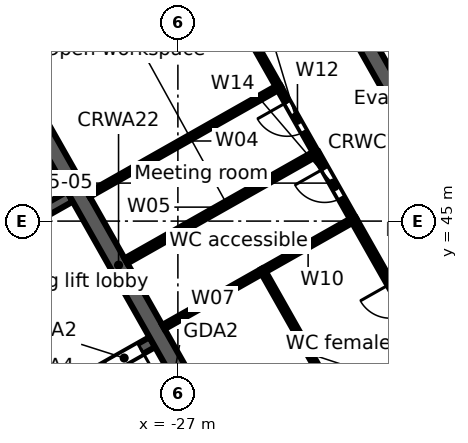
"""IFC4 building model, lengths in metres.
Left out: names, types, materials, properties, quantities, classifications, styles, units other than length and angle.
Written with IfcOpenShell. Run it as: python <this file> out.ifc"""

import sys

from ifc_helpers import new_model, si_unit, direction, frame, frame_2d, origin, place, context, subcontext, project, spatial, rectangle, extrude, element, fill, save


model = new_model("IFC4")
c1 = context("Model", 3, precision=1e-05, world=origin(), true_north=direction((0.0, 1.0)))
c2 = subcontext(c1, "Body", "Model", "MODEL_VIEW")
j1 = project(units=[si_unit("LENGTHUNIT", "METRE"), si_unit("PLANEANGLEUNIT", "RADIAN")], contexts=[c1])
p1 = place(None, origin())
s1 = spatial("IfcSite", under=j1, at=p1, CompositionType="ELEMENT")
p2 = place(p1, origin())
s2 = spatial("IfcBuilding", under=s1, at=p2, CompositionType="ELEMENT")
p3 = place(p2, frame((0.0, 0.0, 207.5)))
s3 = spatial("IfcBuildingStorey", under=s2, at=p3, CompositionType="ELEMENT", Elevation=207.5)
p4 = place(p3, frame((-0.046, 47.974, 0.0), z_axis=(0.0, 0.0, 1.0), x_axis=(-0.870356579543, -0.492421998337, 0.0)))
e1 = element("IfcWall", 1, at=p4, inside=s3, PredefinedType="STANDARD", context=c2, shape_type="SweptSolid", body=[
    extrude(rectangle(XDim=43.754, YDim=0.25, at=frame_2d((21.877, 0.0))), origin(), (0.0, 0.0, 1.0), 3.62),
])
p5 = place(p4, frame((41.061, 0.0, 0.8)))
e2 = element("IfcOpeningElement", 2, at=p5, cuts=e1, PredefinedType="OPENING", context=c2, shape_type="SweptSolid", body=[
    extrude(rectangle(XDim=2.4, YDim=2.2, at=frame_2d((1.2, 1.1))), frame((0.0, 0.135, 0.0), z_axis=(0.0, -1.0, 0.0), x_axis=(1.0, 0.0, 0.0)), (0.0, 0.0, 1.0), 0.27),
])
p6 = place(p4, frame((38.443, 0.0, 0.0)))
e3 = element("IfcOpeningElement", 3, at=p6, cuts=e1, PredefinedType="OPENING", context=c2, shape_type="SweptSolid", body=[
    extrude(rectangle(XDim=1.8, YDim=2.4, at=frame_2d((0.9, 1.2))), frame((0.0, 0.135, 0.0), z_axis=(0.0, -1.0, 0.0), x_axis=(1.0, 0.0, 0.0)), (0.0, 0.0, 1.0), 0.27),
])
p7 = place(p4, frame((35.225, 0.0, 0.8)))
e4 = element("IfcOpeningElement", 4, at=p7, cuts=e1, PredefinedType="OPENING", context=c2, shape_type="SweptSolid", body=[
    extrude(rectangle(XDim=2.4, YDim=2.2, at=frame_2d((1.2, 1.1))), frame((0.0, 0.135, 0.0), z_axis=(0.0, -1.0, 0.0), x_axis=(1.0, 0.0, 0.0)), (0.0, 0.0, 1.0), 0.27),
])
p8 = place(p4, frame((32.307, 0.0, 0.8)))
e5 = element("IfcOpeningElement", 5, at=p8, cuts=e1, PredefinedType="OPENING", context=c2, shape_type="SweptSolid", body=[
    extrude(rectangle(XDim=2.4, YDim=2.2, at=frame_2d((1.2, 1.1))), frame((0.0, 0.135, 0.0), z_axis=(0.0, -1.0, 0.0), x_axis=(1.0, 0.0, 0.0)), (0.0, 0.0, 1.0), 0.27),
])
p9 = place(p4, frame((29.688, 0.0, 0.0)))
e6 = element("IfcOpeningElement", 6, at=p9, cuts=e1, PredefinedType="OPENING", context=c2, shape_type="SweptSolid", body=[
    extrude(rectangle(XDim=1.8, YDim=2.4, at=frame_2d((0.9, 1.2))), frame((0.0, 0.135, 0.0), z_axis=(0.0, -1.0, 0.0), x_axis=(1.0, 0.0, 0.0)), (0.0, 0.0, 1.0), 0.27),
])
p10 = place(p4, frame((26.47, 0.0, 0.8)))
e7 = element("IfcOpeningElement", 7, at=p10, cuts=e1, PredefinedType="OPENING", context=c2, shape_type="SweptSolid", body=[
    extrude(rectangle(XDim=2.4, YDim=2.2, at=frame_2d((1.2, 1.1))), frame((0.0, 0.135, 0.0), z_axis=(0.0, -1.0, 0.0), x_axis=(1.0, 0.0, 0.0)), (0.0, 0.0, 1.0), 0.27),
])
p11 = place(p4, frame((23.552, 0.0, 0.8)))
e8 = element("IfcOpeningElement", 8, at=p11, cuts=e1, PredefinedType="OPENING", context=c2, shape_type="SweptSolid", body=[
    extrude(rectangle(XDim=2.4, YDim=2.2, at=frame_2d((1.2, 1.1))), frame((0.0, 0.135, 0.0), z_axis=(0.0, -1.0, 0.0), x_axis=(1.0, 0.0, 0.0)), (0.0, 0.0, 1.0), 0.27),
])
p12 = place(p4, frame((20.934, 0.0, 0.0)))
e9 = element("IfcOpeningElement", 9, at=p12, cuts=e1, PredefinedType="OPENING", context=c2, shape_type="SweptSolid", body=[
    extrude(rectangle(XDim=1.8, YDim=2.4, at=frame_2d((0.9, 1.2))), frame((0.0, 0.135, 0.0), z_axis=(0.0, -1.0, 0.0), x_axis=(1.0, 0.0, 0.0)), (0.0, 0.0, 1.0), 0.27),
])
p13 = place(p4, frame((17.716, 0.0, 0.8)))
e10 = element("IfcOpeningElement", 10, at=p13, cuts=e1, PredefinedType="OPENING", context=c2, shape_type="SweptSolid", body=[
    extrude(rectangle(XDim=2.4, YDim=2.2, at=frame_2d((1.2, 1.1))), frame((0.0, 0.135, 0.0), z_axis=(0.0, -1.0, 0.0), x_axis=(1.0, 0.0, 0.0)), (0.0, 0.0, 1.0), 0.27),
])
p14 = place(p4, frame((14.798, 0.0, 0.8)))
e11 = element("IfcOpeningElement", 11, at=p14, cuts=e1, PredefinedType="OPENING", context=c2, shape_type="SweptSolid", body=[
    extrude(rectangle(XDim=2.4, YDim=2.2, at=frame_2d((1.2, 1.1))), frame((0.0, 0.135, 0.0), z_axis=(0.0, -1.0, 0.0), x_axis=(1.0, 0.0, 0.0)), (0.0, 0.0, 1.0), 0.27),
])
p15 = place(p4, frame((12.179, 0.0, 0.0)))
e12 = element("IfcOpeningElement", 12, at=p15, cuts=e1, PredefinedType="OPENING", context=c2, shape_type="SweptSolid", body=[
    extrude(rectangle(XDim=1.8, YDim=2.4, at=frame_2d((0.9, 1.2))), frame((0.0, 0.135, 0.0), z_axis=(0.0, -1.0, 0.0), x_axis=(1.0, 0.0, 0.0)), (0.0, 0.0, 1.0), 0.27),
])
p16 = place(p4, frame((8.961, 0.0, 0.8)))
e13 = element("IfcOpeningElement", 13, at=p16, cuts=e1, PredefinedType="OPENING", context=c2, shape_type="SweptSolid", body=[
    extrude(rectangle(XDim=2.4, YDim=2.2, at=frame_2d((1.2, 1.1))), frame((0.0, 0.135, 0.0), z_axis=(0.0, -1.0, 0.0), x_axis=(1.0, 0.0, 0.0)), (0.0, 0.0, 1.0), 0.27),
])
p17 = place(p4, frame((6.043, 0.0, 0.8)))
e14 = element("IfcOpeningElement", 14, at=p17, cuts=e1, PredefinedType="OPENING", context=c2, shape_type="SweptSolid", body=[
    extrude(rectangle(XDim=2.4, YDim=2.2, at=frame_2d((1.2, 1.1))), frame((0.0, 0.135, 0.0), z_axis=(0.0, -1.0, 0.0), x_axis=(1.0, 0.0, 0.0)), (0.0, 0.0, 1.0), 0.27),
])
p18 = place(p4, frame((3.425, 0.0, 0.0)))
e15 = element("IfcOpeningElement", 15, at=p18, cuts=e1, PredefinedType="OPENING", context=c2, shape_type="SweptSolid", body=[
    extrude(rectangle(XDim=1.8, YDim=2.4, at=frame_2d((0.9, 1.2))), frame((0.0, 0.135, 0.0), z_axis=(0.0, -1.0, 0.0), x_axis=(1.0, 0.0, 0.0)), (0.0, 0.0, 1.0), 0.27),
])
p19 = place(p4, frame((0.207, 0.0, 0.8)))
e16 = element("IfcOpeningElement", 16, at=p19, cuts=e1, PredefinedType="OPENING", context=c2, shape_type="SweptSolid", body=[
    extrude(rectangle(XDim=2.4, YDim=2.2, at=frame_2d((1.2, 1.1))), frame((0.0, 0.135, 0.0), z_axis=(0.0, -1.0, 0.0), x_axis=(1.0, 0.0, 0.0)), (0.0, 0.0, 1.0), 0.27),
])
p20 = place(p3, frame((-58.732, 38.771, 0.0), z_axis=(0.0, 0.0, 1.0), x_axis=(0.870354824205, 0.492425100887, 0.0)))
e17 = element("IfcWall", 17, at=p20, inside=s3, PredefinedType="STANDARD", context=c2, shape_type="SweptSolid", body=[
    extrude(rectangle(XDim=64.006, YDim=0.25, at=frame_2d((32.003, 0.0))), origin(), (0.0, 0.0, 1.0), 3.62),
])
p21 = place(p20, frame((61.259, 0.0, 0.8)))
e18 = element("IfcOpeningElement", 18, at=p21, cuts=e17, PredefinedType="OPENING", context=c2, shape_type="SweptSolid", body=[
    extrude(rectangle(XDim=2.4, YDim=2.2, at=frame_2d((1.2, 1.1))), frame((0.0, 0.135, 0.0), z_axis=(0.0, -1.0, 0.0), x_axis=(1.0, 0.0, 0.0)), (0.0, 0.0, 1.0), 0.27),
])
p22 = place(p20, frame((58.216, 0.0, 0.8)))
e19 = element("IfcOpeningElement", 19, at=p22, cuts=e17, PredefinedType="OPENING", context=c2, shape_type="SweptSolid", body=[
    extrude(rectangle(XDim=2.4, YDim=2.2, at=frame_2d((1.2, 1.1))), frame((0.0, 0.135, 0.0), z_axis=(0.0, -1.0, 0.0), x_axis=(1.0, 0.0, 0.0)), (0.0, 0.0, 1.0), 0.27),
])
p23 = place(p20, frame((55.173, 0.0, 0.8)))
e20 = element("IfcOpeningElement", 20, at=p23, cuts=e17, PredefinedType="OPENING", context=c2, shape_type="SweptSolid", body=[
    extrude(rectangle(XDim=2.4, YDim=2.2, at=frame_2d((1.2, 1.1))), frame((0.0, 0.135, 0.0), z_axis=(0.0, -1.0, 0.0), x_axis=(1.0, 0.0, 0.0)), (0.0, 0.0, 1.0), 0.27),
])
p24 = place(p20, frame((52.129, 0.0, 0.8)))
e21 = element("IfcOpeningElement", 21, at=p24, cuts=e17, PredefinedType="OPENING", context=c2, shape_type="SweptSolid", body=[
    extrude(rectangle(XDim=2.4, YDim=2.2, at=frame_2d((1.2, 1.1))), frame((0.0, 0.135, 0.0), z_axis=(0.0, -1.0, 0.0), x_axis=(1.0, 0.0, 0.0)), (0.0, 0.0, 1.0), 0.27),
])
p25 = place(p20, frame((49.086, 0.0, 0.8)))
e22 = element("IfcOpeningElement", 22, at=p25, cuts=e17, PredefinedType="OPENING", context=c2, shape_type="SweptSolid", body=[
    extrude(rectangle(XDim=2.4, YDim=2.2, at=frame_2d((1.2, 1.1))), frame((0.0, 0.135, 0.0), z_axis=(0.0, -1.0, 0.0), x_axis=(1.0, 0.0, 0.0)), (0.0, 0.0, 1.0), 0.27),
])
p26 = place(p20, frame((46.043, 0.0, 0.8)))
e23 = element("IfcOpeningElement", 23, at=p26, cuts=e17, PredefinedType="OPENING", context=c2, shape_type="SweptSolid", body=[
    extrude(rectangle(XDim=2.4, YDim=2.2, at=frame_2d((1.2, 1.1))), frame((0.0, 0.135, 0.0), z_axis=(0.0, -1.0, 0.0), x_axis=(1.0, 0.0, 0.0)), (0.0, 0.0, 1.0), 0.27),
])
p27 = place(p20, frame((43.0, 0.0, 0.8)))
e24 = element("IfcOpeningElement", 24, at=p27, cuts=e17, PredefinedType="OPENING", context=c2, shape_type="SweptSolid", body=[
    extrude(rectangle(XDim=2.4, YDim=2.2, at=frame_2d((1.2, 1.1))), frame((0.0, 0.135, 0.0), z_axis=(0.0, -1.0, 0.0), x_axis=(1.0, 0.0, 0.0)), (0.0, 0.0, 1.0), 0.27),
])
p28 = place(p20, frame((39.956, 0.0, 0.8)))
e25 = element("IfcOpeningElement", 25, at=p28, cuts=e17, PredefinedType="OPENING", context=c2, shape_type="SweptSolid", body=[
    extrude(rectangle(XDim=2.4, YDim=2.2, at=frame_2d((1.2, 1.1))), frame((0.0, 0.135, 0.0), z_axis=(0.0, -1.0, 0.0), x_axis=(1.0, 0.0, 0.0)), (0.0, 0.0, 1.0), 0.27),
])
p29 = place(p20, frame((36.913, 0.0, 0.8)))
e26 = element("IfcOpeningElement", 26, at=p29, cuts=e17, PredefinedType="OPENING", context=c2, shape_type="SweptSolid", body=[
    extrude(rectangle(XDim=2.4, YDim=2.2, at=frame_2d((1.2, 1.1))), frame((0.0, 0.135, 0.0), z_axis=(0.0, -1.0, 0.0), x_axis=(1.0, 0.0, 0.0)), (0.0, 0.0, 1.0), 0.27),
])
p30 = place(p20, frame((33.87, 0.0, 0.8)))
e27 = element("IfcOpeningElement", 27, at=p30, cuts=e17, PredefinedType="OPENING", context=c2, shape_type="SweptSolid", body=[
    extrude(rectangle(XDim=2.4, YDim=2.2, at=frame_2d((1.2, 1.1))), frame((0.0, 0.135, 0.0), z_axis=(0.0, -1.0, 0.0), x_axis=(1.0, 0.0, 0.0)), (0.0, 0.0, 1.0), 0.27),
])
p31 = place(p20, frame((30.826, 0.0, 0.8)))
e28 = element("IfcOpeningElement", 28, at=p31, cuts=e17, PredefinedType="OPENING", context=c2, shape_type="SweptSolid", body=[
    extrude(rectangle(XDim=2.4, YDim=2.2, at=frame_2d((1.2, 1.1))), frame((0.0, 0.135, 0.0), z_axis=(0.0, -1.0, 0.0), x_axis=(1.0, 0.0, 0.0)), (0.0, 0.0, 1.0), 0.27),
])
p32 = place(p20, frame((27.783, 0.0, 0.8)))
e29 = element("IfcOpeningElement", 29, at=p32, cuts=e17, PredefinedType="OPENING", context=c2, shape_type="SweptSolid", body=[
    extrude(rectangle(XDim=2.4, YDim=2.2, at=frame_2d((1.2, 1.1))), frame((0.0, 0.135, 0.0), z_axis=(0.0, -1.0, 0.0), x_axis=(1.0, 0.0, 0.0)), (0.0, 0.0, 1.0), 0.27),
])
p33 = place(p20, frame((24.74, 0.0, 0.8)))
e30 = element("IfcOpeningElement", 30, at=p33, cuts=e17, PredefinedType="OPENING", context=c2, shape_type="SweptSolid", body=[
    extrude(rectangle(XDim=2.4, YDim=2.2, at=frame_2d((1.2, 1.1))), frame((0.0, 0.135, 0.0), z_axis=(0.0, -1.0, 0.0), x_axis=(1.0, 0.0, 0.0)), (0.0, 0.0, 1.0), 0.27),
])
p34 = place(p20, frame((21.696, 0.0, 0.8)))
e31 = element("IfcOpeningElement", 31, at=p34, cuts=e17, PredefinedType="OPENING", context=c2, shape_type="SweptSolid", body=[
    extrude(rectangle(XDim=2.4, YDim=2.2, at=frame_2d((1.2, 1.1))), frame((0.0, 0.135, 0.0), z_axis=(0.0, -1.0, 0.0), x_axis=(1.0, 0.0, 0.0)), (0.0, 0.0, 1.0), 0.27),
])
p35 = place(p20, frame((18.653, 0.0, 0.8)))
e32 = element("IfcOpeningElement", 32, at=p35, cuts=e17, PredefinedType="OPENING", context=c2, shape_type="SweptSolid", body=[
    extrude(rectangle(XDim=2.4, YDim=2.2, at=frame_2d((1.2, 1.1))), frame((0.0, 0.135, 0.0), z_axis=(0.0, -1.0, 0.0), x_axis=(1.0, 0.0, 0.0)), (0.0, 0.0, 1.0), 0.27),
])
p36 = place(p20, frame((15.61, 0.0, 0.8)))
e33 = element("IfcOpeningElement", 33, at=p36, cuts=e17, PredefinedType="OPENING", context=c2, shape_type="SweptSolid", body=[
    extrude(rectangle(XDim=2.4, YDim=2.2, at=frame_2d((1.2, 1.1))), frame((0.0, 0.135, 0.0), z_axis=(0.0, -1.0, 0.0), x_axis=(1.0, 0.0, 0.0)), (0.0, 0.0, 1.0), 0.27),
])
p37 = place(p20, frame((12.567, 0.0, 0.8)))
e34 = element("IfcOpeningElement", 34, at=p37, cuts=e17, PredefinedType="OPENING", context=c2, shape_type="SweptSolid", body=[
    extrude(rectangle(XDim=2.4, YDim=2.2, at=frame_2d((1.2, 1.1))), frame((0.0, 0.135, 0.0), z_axis=(0.0, -1.0, 0.0), x_axis=(1.0, 0.0, 0.0)), (0.0, 0.0, 1.0), 0.27),
])
p38 = place(p20, frame((9.523, 0.0, 0.8)))
e35 = element("IfcOpeningElement", 35, at=p38, cuts=e17, PredefinedType="OPENING", context=c2, shape_type="SweptSolid", body=[
    extrude(rectangle(XDim=2.4, YDim=2.2, at=frame_2d((1.2, 1.1))), frame((0.0, 0.135, 0.0), z_axis=(0.0, -1.0, 0.0), x_axis=(1.0, 0.0, 0.0)), (0.0, 0.0, 1.0), 0.27),
])
p39 = place(p20, frame((6.48, 0.0, 0.8)))
e36 = element("IfcOpeningElement", 36, at=p39, cuts=e17, PredefinedType="OPENING", context=c2, shape_type="SweptSolid", body=[
    extrude(rectangle(XDim=2.4, YDim=2.2, at=frame_2d((1.2, 1.1))), frame((0.0, 0.135, 0.0), z_axis=(0.0, -1.0, 0.0), x_axis=(1.0, 0.0, 0.0)), (0.0, 0.0, 1.0), 0.27),
])
p40 = place(p20, frame((3.437, 0.0, 0.8)))
e37 = element("IfcOpeningElement", 37, at=p40, cuts=e17, PredefinedType="OPENING", context=c2, shape_type="SweptSolid", body=[
    extrude(rectangle(XDim=2.4, YDim=2.2, at=frame_2d((1.2, 1.1))), frame((0.0, 0.135, 0.0), z_axis=(0.0, -1.0, 0.0), x_axis=(1.0, 0.0, 0.0)), (0.0, 0.0, 1.0), 0.27),
])
p41 = place(p20, frame((0.393, 0.0, 0.8)))
e38 = element("IfcOpeningElement", 38, at=p41, cuts=e17, PredefinedType="OPENING", context=c2, shape_type="SweptSolid", body=[
    extrude(rectangle(XDim=2.4, YDim=2.2, at=frame_2d((1.2, 1.1))), frame((0.0, 0.135, 0.0), z_axis=(0.0, -1.0, 0.0), x_axis=(1.0, 0.0, 0.0)), (0.0, 0.0, 1.0), 0.27),
])
p42 = place(p3, frame((-34.245, 38.097, 0.0), z_axis=(0.0, 0.0, 1.0), x_axis=(0.870360409231, 0.492415229297, 0.0)))
e39 = element("IfcWall", 39, at=p42, inside=s3, PredefinedType="SOLIDWALL", context=c2, shape_type="SweptSolid", body=[
    extrude(rectangle(XDim=7.55, YDim=0.3, at=frame_2d((3.775, 0.0))), origin(), (0.0, 0.0, 1.0), 3.62),
])
p43 = place(p42, frame((6.2, 0.0, 0.0)))
e40 = element("IfcOpeningElement", 40, at=p43, cuts=e39, PredefinedType="OPENING", context=c2, shape_type="SweptSolid", body=[
    extrude(rectangle(XDim=1.0, YDim=2.1, at=frame_2d((0.5, 1.05))), frame((0.0, 0.16, 0.0), z_axis=(0.0, -1.0, 0.0), x_axis=(1.0, 0.0, 0.0)), (0.0, 0.0, 1.0), 0.32),
])
p44 = place(p3, frame((-37.282, 41.435, 0.0), z_axis=(0.0, 0.0, 1.0), x_axis=(0.870352688754, 0.492428875248, 0.0)))
e41 = element("IfcWall", 41, at=p44, inside=s3, PredefinedType="SOLIDWALL", context=c2, shape_type="SweptSolid", body=[
    extrude(rectangle(XDim=8.55, YDim=0.3, at=frame_2d((4.275, 0.0))), origin(), (0.0, 0.0, 1.0), 3.62),
])
p45 = place(p44, frame((6.2, 0.0, 0.0)))
e42 = element("IfcOpeningElement", 42, at=p45, cuts=e41, PredefinedType="OPENING", context=c2, shape_type="SweptSolid", body=[
    extrude(rectangle(XDim=1.1, YDim=2.1, at=frame_2d((0.55, 1.05))), frame((0.0, 0.16, 0.0), z_axis=(0.0, -1.0, 0.0), x_axis=(1.0, 0.0, 0.0)), (0.0, 0.0, 1.0), 0.32),
])
p46 = place(p44, frame((1.55, 0.0, 0.0)))
e43 = element("IfcOpeningElement", 43, at=p46, cuts=e41, PredefinedType="OPENING", context=c2, shape_type="SweptSolid", body=[
    extrude(rectangle(XDim=0.9, YDim=2.1, at=frame_2d((0.45, 1.05))), frame((0.0, 0.16, 0.0), z_axis=(0.0, -1.0, 0.0), x_axis=(1.0, 0.0, 0.0)), (0.0, 0.0, 1.0), 0.32),
])
p47 = place(p3, frame((-31.787, 49.542, 0.0), z_axis=(0.0, 0.0, 1.0), x_axis=(0.492421378713, -0.870356930107, 0.0)))
e44 = element("IfcWall", 44, at=p47, inside=s3, PredefinedType="SOLIDWALL", context=c2, shape_type="SweptSolid", body=[
    extrude(rectangle(XDim=13.1, YDim=0.45, at=frame_2d((6.55, 0.0))), origin(), (0.0, 0.0, 1.0), 3.62),
])
p48 = place(p3, frame((-24.353, 53.747, 0.0), z_axis=(0.0, 0.0, 1.0), x_axis=(0.492435496286, -0.870348942665, 0.0)))
e45 = element("IfcWall", 45, at=p48, inside=s3, PredefinedType="SOLIDWALL", context=c2, shape_type="SweptSolid", body=[
    extrude(rectangle(XDim=13.1, YDim=0.45, at=frame_2d((6.55, 0.0))), origin(), (0.0, 0.0, 1.0), 3.62),
])
p49 = place(p3, frame((-29.35, 45.692, 0.0), z_axis=(0.0, 0.0, 1.0), x_axis=(0.870294630003, 0.492531478169, 0.0)))
e46 = element("IfcWall", 46, at=p49, inside=s3, PredefinedType="PARTITIONING", context=c2, shape_type="SweptSolid", body=[
    extrude(rectangle(XDim=5.75, YDim=0.125, at=frame_2d((2.875, 0.0))), origin(), (0.0, 0.0, 1.0), 3.62),
])
p50 = place(p3, frame((-28.366, 43.952, 0.0), z_axis=(0.0, 0.0, 1.0), x_axis=(0.870398309195, 0.492348233825, 0.0)))
e47 = element("IfcWall", 47, at=p50, inside=s3, PredefinedType="PARTITIONING", context=c2, shape_type="SweptSolid", body=[
    extrude(rectangle(XDim=5.75, YDim=0.15, at=frame_2d((2.875, 0.0))), origin(), (0.0, 0.0, 1.0), 2.892),
])
p51 = place(p3, frame((-27.381, 42.211, 0.0), z_axis=(0.0, 0.0, 1.0), x_axis=(0.870388475779, 0.492365617434, 0.0)))
e48 = element("IfcWall", 48, at=p51, inside=s3, PredefinedType="PARTITIONING", context=c2, shape_type="SweptSolid", body=[
    extrude(rectangle(XDim=3.0, YDim=0.125, at=frame_2d((1.5, 0.0))), origin(), (0.0, 0.0, 1.0), 2.892),
])
p52 = place(p3, frame((-26.808, 52.876, 0.0), z_axis=(0.0, 0.0, 1.0), x_axis=(0.492406341242, -0.870365437678, 0.0)))
e49 = element("IfcWall", 49, at=p52, inside=s3, PredefinedType="PARTITIONING", context=c2, shape_type="SweptSolid", body=[
    extrude(rectangle(XDim=5.0, YDim=0.125, at=frame_2d((2.5, 0.0))), origin(), (0.0, 0.0, 1.0), 3.62),
])
p53 = place(p52, frame((1.95, 0.0, 0.0)))
e50 = element("IfcOpeningElement", 50, at=p53, cuts=e49, PredefinedType="OPENING", context=c2, shape_type="SweptSolid", body=[
    extrude(rectangle(XDim=0.9, YDim=2.1, at=frame_2d((0.45, 1.05))), frame((0.0, 0.073, 0.0), z_axis=(0.0, -1.0, 0.0), x_axis=(1.0, 0.0, 0.0)), (0.0, 0.0, 1.0), 0.145),
])
p54 = place(p3, frame((-24.77, 43.688, 0.0), z_axis=(0.0, 0.0, 1.0), x_axis=(0.870430549821, 0.492291232848, 0.0)))
e51 = element("IfcWall", 51, at=p54, inside=s3, PredefinedType="PARTITIONING", context=c2, shape_type="SweptSolid", body=[
    extrude(rectangle(XDim=2.75, YDim=0.125, at=frame_2d((1.375, 0.0))), origin(), (0.0, 0.0, 1.0), 3.62),
])
p55 = place(p3, frame((-24.77, 43.688, 0.0), z_axis=(0.0, 0.0, 1.0), x_axis=(0.492369352746, -0.870386362759, 0.0)))
e52 = element("IfcWall", 52, at=p55, inside=s3, PredefinedType="PARTITIONING", context=c2, shape_type="SweptSolid", body=[
    extrude(rectangle(XDim=5.0, YDim=0.125, at=frame_2d((2.5, 0.0))), origin(), (0.0, 0.0, 1.0), 3.62),
])
p56 = place(p3, frame((-24.346, 48.524, 0.0), z_axis=(0.0, 0.0, 1.0), x_axis=(0.492374954878, -0.870383193662, 0.0)))
e53 = element("IfcWall", 53, at=p56, inside=s3, PredefinedType="PARTITIONING", context=c2, shape_type="SweptSolid", body=[
    extrude(rectangle(XDim=2.0, YDim=0.125, at=frame_2d((1.0, 0.0))), origin(), (0.0, 0.0, 1.0), 2.892),
])
p57 = place(p56, frame((0.45, 0.0, 0.0)))
e54 = element("IfcOpeningElement", 54, at=p57, cuts=e53, PredefinedType="OPENING", context=c2, shape_type="SweptSolid", body=[
    extrude(rectangle(XDim=0.9, YDim=2.1, at=frame_2d((0.45, 1.05))), frame((0.0, 0.073, 0.0), z_axis=(0.0, -1.0, 0.0), x_axis=(1.0, 0.0, 0.0)), (0.0, 0.0, 1.0), 0.145),
])
p58 = place(p3, frame((-23.361, 46.783, 0.0), z_axis=(0.0, 0.0, 1.0), x_axis=(0.492467412326, -0.870330884088, 0.0)))
e55 = element("IfcWall", 55, at=p58, inside=s3, PredefinedType="PARTITIONING", context=c2, shape_type="SweptSolid", body=[
    extrude(rectangle(XDim=2.0, YDim=0.15, at=frame_2d((1.0, 0.0))), origin(), (0.0, 0.0, 1.0), 2.892),
])
p59 = place(p58, frame((0.45, 0.0, 0.0)))
e56 = element("IfcOpeningElement", 56, at=p59, cuts=e55, PredefinedType="OPENING", context=c2, shape_type="SweptSolid", body=[
    extrude(rectangle(XDim=0.9, YDim=2.1, at=frame_2d((0.45, 1.05))), frame((0.0, 0.085, 0.0), z_axis=(0.0, -1.0, 0.0), x_axis=(1.0, 0.0, 0.0)), (0.0, 0.0, 1.0), 0.17),
])
p60 = place(p3, frame((-22.376, 45.042, 0.0), z_axis=(0.0, 0.0, 1.0), x_axis=(0.49245306389, -0.870339002841, 0.0)))
e57 = element("IfcWall", 57, at=p60, inside=s3, PredefinedType="PARTITIONING", context=c2, shape_type="SweptSolid", body=[
    extrude(rectangle(XDim=4.999, YDim=0.15, at=frame_2d((2.5, 0.0))), origin(), (0.0, 0.0, 1.0), 3.62),
])
p61 = place(p60, frame((1.95, 0.0, 0.0)))
e58 = element("IfcOpeningElement", 58, at=p61, cuts=e57, PredefinedType="OPENING", context=c2, shape_type="SweptSolid", body=[
    extrude(rectangle(XDim=0.9, YDim=2.1, at=frame_2d((0.45, 1.05))), frame((0.0, 0.085, 0.0), z_axis=(0.0, -1.0, 0.0), x_axis=(1.0, 0.0, 0.0)), (0.0, 0.0, 1.0), 0.17),
])
p62 = place(p43, frame((1.0, 0.0, 0.0), z_axis=(0.0, 0.0, 1.0), x_axis=(-1.0, 0.0, 0.0)))
e59 = element("IfcDoor", 59, at=p62, inside=s3, OperationType="SINGLE_SWING_LEFT", PredefinedType="DOOR", context=c2, shape_type="SweptSolid", body=[
    extrude(rectangle(XDim=1.0, YDim=2.1, at=frame_2d((0.5, 1.05))), frame((0.0, 0.025, 0.0), z_axis=(0.0, -1.0, 0.0), x_axis=(1.0, 0.0, 0.0)), (0.0, 0.0, 1.0), 0.05),
])
fill(e40, e59)
p63 = place(p59, frame((0.9, 0.0, 0.0), z_axis=(0.0, 0.0, 1.0), x_axis=(-1.0, 0.0, 0.0)))
e60 = element("IfcDoor", 60, at=p63, inside=s3, OperationType="SINGLE_SWING_RIGHT", PredefinedType="DOOR", context=c2, shape_type="SweptSolid", body=[
    extrude(rectangle(XDim=0.9, YDim=2.1, at=frame_2d((0.45, 1.05))), frame((0.0, 0.025, 0.0), z_axis=(0.0, -1.0, 0.0), x_axis=(1.0, 0.0, 0.0)), (0.0, 0.0, 1.0), 0.05),
])
fill(e56, e60)
p64 = place(p57, frame((0.9, 0.0, 0.0), z_axis=(0.0, 0.0, 1.0), x_axis=(-1.0, 0.0, 0.0)))
e61 = element("IfcDoor", 61, at=p64, inside=s3, OperationType="SINGLE_SWING_RIGHT", PredefinedType="DOOR", context=c2, shape_type="SweptSolid", body=[
    extrude(rectangle(XDim=0.9, YDim=2.1, at=frame_2d((0.45, 1.05))), frame((0.0, 0.025, 0.0), z_axis=(0.0, -1.0, 0.0), x_axis=(1.0, 0.0, 0.0)), (0.0, 0.0, 1.0), 0.05),
])
fill(e54, e61)
save(model, sys.argv[1])
